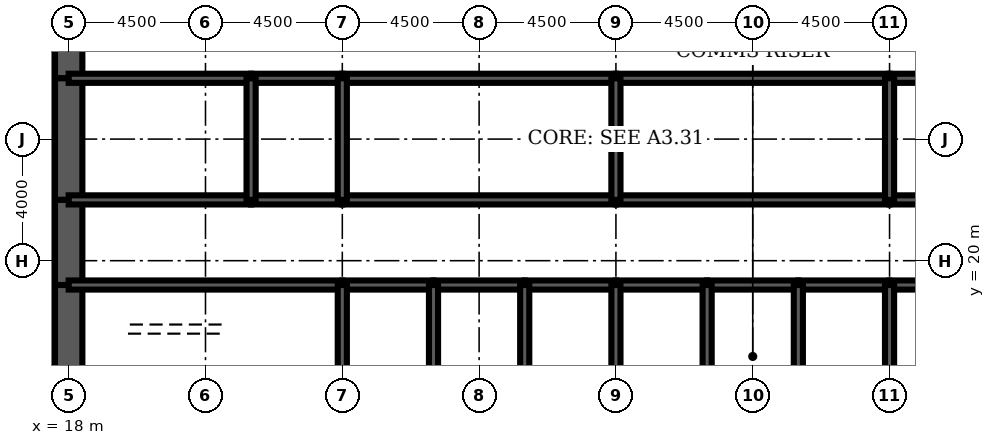
"""IFC4 building model, lengths in metres.
Left out: names, types, materials, properties, quantities, classifications, styles, units other than length and angle.
Written with IfcOpenShell. Run it as: python <this file> out.ifc"""

import sys

from ifc_helpers import new_model, si_unit, direction, frame, frame_2d, origin, place, context, subcontext, project, spatial, rectangle, extrude, element, fill, save


model = new_model("IFC4")
c1 = context("Model", 3, precision=1e-05, world=origin(), true_north=direction((0.0, 1.0)))
c2 = subcontext(c1, "Body", "Model", "MODEL_VIEW")
j1 = project(units=[si_unit("LENGTHUNIT", "METRE"), si_unit("PLANEANGLEUNIT", "RADIAN")], contexts=[c1])
p1 = place(None, origin())
s1 = spatial("IfcSite", under=j1, at=p1, CompositionType="ELEMENT")
p2 = place(p1, origin())
s2 = spatial("IfcBuilding", under=s1, at=p2, CompositionType="ELEMENT")
p3 = place(p2, frame((0.0, 0.0, 134.1)))
s3 = spatial("IfcBuildingStorey", under=s2, at=p3, CompositionType="ELEMENT", Elevation=134.1)
p4 = place(p3, frame((18.0, 28.8, 0.0), z_axis=(0.0, 0.0, 1.0), x_axis=(0.0, -1.0, 0.0)))
e1 = element("IfcWall", 1, at=p4, inside=s3, PredefinedType="SHEAR", context=c2, shape_type="SweptSolid", body=[
    extrude(rectangle(XDim=2.8, YDim=0.9, at=frame_2d((1.4, 0.0))), origin(), (0.0, 0.0, 1.0), 4.2),
])
p5 = place(p4, frame((0.4, 0.0, 0.0)))
e2 = element("IfcOpeningElement", 2, at=p5, cuts=e1, PredefinedType="OPENING", context=c2, shape_type="SweptSolid", body=[
    extrude(rectangle(XDim=1.8, YDim=2.1, at=frame_2d((0.9, 1.05))), frame((0.0, 0.46, 0.0), z_axis=(0.0, -1.0, 0.0), x_axis=(1.0, 0.0, 0.0)), (0.0, 0.0, 1.0), 0.92),
])
p6 = place(p3, frame((18.0, 26.0, 0.0), z_axis=(0.0, 0.0, 1.0), x_axis=(0.0, -1.0, 0.0)))
e3 = element("IfcWall", 3, at=p6, inside=s3, PredefinedType="SHEAR", context=c2, shape_type="SweptSolid", body=[
    extrude(rectangle(XDim=4.0, YDim=0.9, at=frame_2d((2.0, 0.0))), origin(), (0.0, 0.0, 1.0), 4.2),
])
p7 = place(p3, frame((18.0, 22.0, 0.0), z_axis=(0.0, 0.0, 1.0), x_axis=(0.0, -1.0, 0.0)))
e4 = element("IfcWall", 4, at=p7, inside=s3, PredefinedType="SHEAR", context=c2, shape_type="SweptSolid", body=[
    extrude(rectangle(XDim=2.8, YDim=0.9, at=frame_2d((1.4, 0.0))), origin(), (0.0, 0.0, 1.0), 4.2),
])
p8 = place(p7, frame((0.6, 0.0, 0.0)))
e5 = element("IfcOpeningElement", 5, at=p8, cuts=e4, PredefinedType="OPENING", context=c2, shape_type="SweptSolid", body=[
    extrude(rectangle(XDim=1.8, YDim=2.1, at=frame_2d((0.9, 1.05))), frame((0.0, 0.46, 0.0), z_axis=(0.0, -1.0, 0.0), x_axis=(1.0, 0.0, 0.0)), (0.0, 0.0, 1.0), 0.92),
])
p9 = place(p3, frame((18.0, 19.2, 0.0), z_axis=(0.0, 0.0, 1.0), x_axis=(0.0, -1.0, 0.0)))
e6 = element("IfcWall", 6, at=p9, inside=s3, PredefinedType="SHEAR", context=c2, shape_type="SweptSolid", body=[
    extrude(rectangle(XDim=3.2, YDim=0.9, at=frame_2d((1.6, 0.0))), origin(), (0.0, 0.0, 1.0), 4.2),
])
p10 = place(p3, frame((18.0, 19.2, 0.0), z_axis=(0.0, 0.0, 1.0), x_axis=(1.0, 0.0, 0.0)))
e7 = element("IfcWall", 7, at=p10, inside=s3, PredefinedType="SOLIDWALL", context=c2, shape_type="SweptSolid", body=[
    extrude(rectangle(XDim=9.0, YDim=0.3, at=frame_2d((4.5, 0.0))), origin(), (0.0, 0.0, 1.0), 4.2),
])
p11 = place(p10, frame((0.65, 0.0, 0.0)))
e8 = element("IfcOpeningElement", 8, at=p11, cuts=e7, PredefinedType="OPENING", context=c2, shape_type="SweptSolid", body=[
    extrude(rectangle(XDim=1.0, YDim=2.1, at=frame_2d((0.5, 1.05))), frame((0.0, 0.16, 0.0), z_axis=(0.0, -1.0, 0.0), x_axis=(1.0, 0.0, 0.0)), (0.0, 0.0, 1.0), 0.32),
])
p12 = place(p3, frame((27.0, 19.2, 0.0), z_axis=(0.0, 0.0, 1.0), x_axis=(1.0, 0.0, 0.0)))
e9 = element("IfcWall", 9, at=p12, inside=s3, PredefinedType="SOLIDWALL", context=c2, shape_type="SweptSolid", body=[
    extrude(rectangle(XDim=3.0, YDim=0.3, at=frame_2d((1.5, 0.0))), origin(), (0.0, 0.0, 1.0), 4.2),
])
p13 = place(p12, frame((0.95, 0.0, 0.0)))
e10 = element("IfcOpeningElement", 10, at=p13, cuts=e9, PredefinedType="OPENING", context=c2, shape_type="SweptSolid", body=[
    extrude(rectangle(XDim=1.1, YDim=2.2, at=frame_2d((0.55, 1.1))), frame((0.0, 0.16, 0.0), z_axis=(0.0, -1.0, 0.0), x_axis=(1.0, 0.0, 0.0)), (0.0, 0.0, 1.0), 0.32),
])
p14 = place(p3, frame((30.0, 19.2, 0.0), z_axis=(0.0, 0.0, 1.0), x_axis=(1.0, 0.0, 0.0)))
e11 = element("IfcWall", 11, at=p14, inside=s3, PredefinedType="SOLIDWALL", context=c2, shape_type="SweptSolid", body=[
    extrude(rectangle(XDim=3.0, YDim=0.3, at=frame_2d((1.5, 0.0))), origin(), (0.0, 0.0, 1.0), 4.2),
])
p15 = place(p14, frame((0.95, 0.0, 0.0)))
e12 = element("IfcOpeningElement", 12, at=p15, cuts=e11, PredefinedType="OPENING", context=c2, shape_type="SweptSolid", body=[
    extrude(rectangle(XDim=1.1, YDim=2.2, at=frame_2d((0.55, 1.1))), frame((0.0, 0.16, 0.0), z_axis=(0.0, -1.0, 0.0), x_axis=(1.0, 0.0, 0.0)), (0.0, 0.0, 1.0), 0.32),
])
p16 = place(p3, frame((33.0, 19.2, 0.0), z_axis=(0.0, 0.0, 1.0), x_axis=(1.0, 0.0, 0.0)))
e13 = element("IfcWall", 13, at=p16, inside=s3, PredefinedType="SOLIDWALL", context=c2, shape_type="SweptSolid", body=[
    extrude(rectangle(XDim=3.0, YDim=0.3, at=frame_2d((1.5, 0.0))), origin(), (0.0, 0.0, 1.0), 4.2),
])
p17 = place(p16, frame((0.95, 0.0, 0.0)))
e14 = element("IfcOpeningElement", 14, at=p17, cuts=e13, PredefinedType="OPENING", context=c2, shape_type="SweptSolid", body=[
    extrude(rectangle(XDim=1.1, YDim=2.2, at=frame_2d((0.55, 1.1))), frame((0.0, 0.16, 0.0), z_axis=(0.0, -1.0, 0.0), x_axis=(1.0, 0.0, 0.0)), (0.0, 0.0, 1.0), 0.32),
])
p18 = place(p3, frame((36.0, 19.2, 0.0), z_axis=(0.0, 0.0, 1.0), x_axis=(1.0, 0.0, 0.0)))
e15 = element("IfcWall", 15, at=p18, inside=s3, PredefinedType="SOLIDWALL", context=c2, shape_type="SweptSolid", body=[
    extrude(rectangle(XDim=3.0, YDim=0.3, at=frame_2d((1.5, 0.0))), origin(), (0.0, 0.0, 1.0), 4.2),
])
p19 = place(p18, frame((0.95, 0.0, 0.0)))
e16 = element("IfcOpeningElement", 16, at=p19, cuts=e15, PredefinedType="OPENING", context=c2, shape_type="SweptSolid", body=[
    extrude(rectangle(XDim=1.1, YDim=2.2, at=frame_2d((0.55, 1.1))), frame((0.0, 0.16, 0.0), z_axis=(0.0, -1.0, 0.0), x_axis=(1.0, 0.0, 0.0)), (0.0, 0.0, 1.0), 0.32),
])
p20 = place(p3, frame((39.0, 19.2, 0.0), z_axis=(0.0, 0.0, 1.0), x_axis=(1.0, 0.0, 0.0)))
e17 = element("IfcWall", 17, at=p20, inside=s3, PredefinedType="SOLIDWALL", context=c2, shape_type="SweptSolid", body=[
    extrude(rectangle(XDim=3.0, YDim=0.3, at=frame_2d((1.5, 0.0))), origin(), (0.0, 0.0, 1.0), 4.2),
])
p21 = place(p20, frame((1.0, 0.0, 0.0)))
e18 = element("IfcOpeningElement", 18, at=p21, cuts=e17, PredefinedType="OPENING", context=c2, shape_type="SweptSolid", body=[
    extrude(rectangle(XDim=1.0, YDim=2.1, at=frame_2d((0.5, 1.05))), frame((0.0, 0.16, 0.0), z_axis=(0.0, -1.0, 0.0), x_axis=(1.0, 0.0, 0.0)), (0.0, 0.0, 1.0), 0.32),
])
p22 = place(p3, frame((42.0, 19.2, 0.0), z_axis=(0.0, 0.0, 1.0), x_axis=(1.0, 0.0, 0.0)))
e19 = element("IfcWall", 19, at=p22, inside=s3, PredefinedType="SOLIDWALL", context=c2, shape_type="SweptSolid", body=[
    extrude(rectangle(XDim=3.0, YDim=0.3, at=frame_2d((1.5, 0.0))), origin(), (0.0, 0.0, 1.0), 4.2),
])
p23 = place(p3, frame((45.0, 19.2, 0.0), z_axis=(0.0, 0.0, 1.0), x_axis=(1.0, 0.0, 0.0)))
e20 = element("IfcWall", 20, at=p23, inside=s3, PredefinedType="SOLIDWALL", context=c2, shape_type="SweptSolid", body=[
    extrude(rectangle(XDim=9.0, YDim=0.3, at=frame_2d((4.5, 0.0))), origin(), (0.0, 0.0, 1.0), 4.2),
])
p24 = place(p23, frame((7.35, 0.0, 0.0)))
e21 = element("IfcOpeningElement", 21, at=p24, cuts=e20, PredefinedType="OPENING", context=c2, shape_type="SweptSolid", body=[
    extrude(rectangle(XDim=1.0, YDim=2.1, at=frame_2d((0.5, 1.05))), frame((0.0, 0.16, 0.0), z_axis=(0.0, -1.0, 0.0), x_axis=(1.0, 0.0, 0.0)), (0.0, 0.0, 1.0), 0.32),
])
p25 = place(p3, frame((18.0, 22.0, 0.0), z_axis=(0.0, 0.0, 1.0), x_axis=(1.0, 0.0, 0.0)))
e22 = element("IfcWall", 22, at=p25, inside=s3, PredefinedType="SOLIDWALL", context=c2, shape_type="SweptSolid", body=[
    extrude(rectangle(XDim=6.0, YDim=0.3, at=frame_2d((3.0, 0.0))), origin(), (0.0, 0.0, 1.0), 4.2),
])
p26 = place(p25, frame((4.4, 0.0, 0.0)))
e23 = element("IfcOpeningElement", 23, at=p26, cuts=e22, PredefinedType="OPENING", context=c2, shape_type="SweptSolid", body=[
    extrude(rectangle(XDim=1.0, YDim=2.1, at=frame_2d((0.5, 1.05))), frame((0.0, 0.16, 0.0), z_axis=(0.0, -1.0, 0.0), x_axis=(1.0, 0.0, 0.0)), (0.0, 0.0, 1.0), 0.32),
])
p27 = place(p25, frame((0.7, 0.0, 0.0)))
e24 = element("IfcOpeningElement", 24, at=p27, cuts=e22, PredefinedType="OPENING", context=c2, shape_type="SweptSolid", body=[
    extrude(rectangle(XDim=1.0, YDim=2.1, at=frame_2d((0.5, 1.05))), frame((0.0, 0.16, 0.0), z_axis=(0.0, -1.0, 0.0), x_axis=(1.0, 0.0, 0.0)), (0.0, 0.0, 1.0), 0.32),
])
p28 = place(p3, frame((24.0, 22.0, 0.0), z_axis=(0.0, 0.0, 1.0), x_axis=(1.0, 0.0, 0.0)))
e25 = element("IfcWall", 25, at=p28, inside=s3, PredefinedType="SOLIDWALL", context=c2, shape_type="SweptSolid", body=[
    extrude(rectangle(XDim=3.0, YDim=0.3, at=frame_2d((1.5, 0.0))), origin(), (0.0, 0.0, 1.0), 4.2),
])
p29 = place(p28, frame((1.0, 0.0, 0.0)))
e26 = element("IfcOpeningElement", 26, at=p29, cuts=e25, PredefinedType="OPENING", context=c2, shape_type="SweptSolid", body=[
    extrude(rectangle(XDim=1.0, YDim=2.1, at=frame_2d((0.5, 1.05))), frame((0.0, 0.16, 0.0), z_axis=(0.0, -1.0, 0.0), x_axis=(1.0, 0.0, 0.0)), (0.0, 0.0, 1.0), 0.32),
])
p30 = place(p3, frame((27.0, 22.0, 0.0), z_axis=(0.0, 0.0, 1.0), x_axis=(1.0, 0.0, 0.0)))
e27 = element("IfcWall", 27, at=p30, inside=s3, PredefinedType="SOLIDWALL", context=c2, shape_type="SweptSolid", body=[
    extrude(rectangle(XDim=9.0, YDim=0.3, at=frame_2d((4.5, 0.0))), origin(), (0.0, 0.0, 1.0), 4.2),
])
p31 = place(p30, frame((4.0, 0.0, 0.0)))
e28 = element("IfcOpeningElement", 28, at=p31, cuts=e27, PredefinedType="OPENING", context=c2, shape_type="SweptSolid", body=[
    extrude(rectangle(XDim=1.0, YDim=2.1, at=frame_2d((0.5, 1.05))), frame((0.0, 0.16, 0.0), z_axis=(0.0, -1.0, 0.0), x_axis=(1.0, 0.0, 0.0)), (0.0, 0.0, 1.0), 0.32),
])
p32 = place(p3, frame((36.0, 22.0, 0.0), z_axis=(0.0, 0.0, 1.0), x_axis=(1.0, 0.0, 0.0)))
e29 = element("IfcWall", 29, at=p32, inside=s3, PredefinedType="SOLIDWALL", context=c2, shape_type="SweptSolid", body=[
    extrude(rectangle(XDim=9.0, YDim=0.3, at=frame_2d((4.5, 0.0))), origin(), (0.0, 0.0, 1.0), 4.2),
])
p33 = place(p32, frame((4.0, 0.0, 0.0)))
e30 = element("IfcOpeningElement", 30, at=p33, cuts=e29, PredefinedType="OPENING", context=c2, shape_type="SweptSolid", body=[
    extrude(rectangle(XDim=1.0, YDim=2.1, at=frame_2d((0.5, 1.05))), frame((0.0, 0.16, 0.0), z_axis=(0.0, -1.0, 0.0), x_axis=(1.0, 0.0, 0.0)), (0.0, 0.0, 1.0), 0.32),
])
p34 = place(p3, frame((45.0, 22.0, 0.0), z_axis=(0.0, 0.0, 1.0), x_axis=(1.0, 0.0, 0.0)))
e31 = element("IfcWall", 31, at=p34, inside=s3, PredefinedType="SOLIDWALL", context=c2, shape_type="SweptSolid", body=[
    extrude(rectangle(XDim=3.0, YDim=0.3, at=frame_2d((1.5, 0.0))), origin(), (0.0, 0.0, 1.0), 4.2),
])
p35 = place(p34, frame((1.0, 0.0, 0.0)))
e32 = element("IfcOpeningElement", 32, at=p35, cuts=e31, PredefinedType="OPENING", context=c2, shape_type="SweptSolid", body=[
    extrude(rectangle(XDim=1.0, YDim=2.1, at=frame_2d((0.5, 1.05))), frame((0.0, 0.16, 0.0), z_axis=(0.0, -1.0, 0.0), x_axis=(1.0, 0.0, 0.0)), (0.0, 0.0, 1.0), 0.32),
])
p36 = place(p3, frame((18.0, 26.0, 0.0), z_axis=(0.0, 0.0, 1.0), x_axis=(1.0, 0.0, 0.0)))
e33 = element("IfcWall", 33, at=p36, inside=s3, PredefinedType="SOLIDWALL", context=c2, shape_type="SweptSolid", body=[
    extrude(rectangle(XDim=6.0, YDim=0.3, at=frame_2d((3.0, 0.0))), origin(), (0.0, 0.0, 1.0), 4.2),
])
p37 = place(p3, frame((24.0, 26.0, 0.0), z_axis=(0.0, 0.0, 1.0), x_axis=(1.0, 0.0, 0.0)))
e34 = element("IfcWall", 34, at=p37, inside=s3, PredefinedType="SOLIDWALL", context=c2, shape_type="SweptSolid", body=[
    extrude(rectangle(XDim=3.0, YDim=0.3, at=frame_2d((1.5, 0.0))), origin(), (0.0, 0.0, 1.0), 4.2),
])
for number, where, z_axis, x_axis in (
    (35, (27.0, 26.0, 0.0), (0.0, 0.0, 1.0), (1.0, 0.0, 0.0)),
    (36, (36.0, 26.0, 0.0), (0.0, 0.0, 1.0), (1.0, 0.0, 0.0)),
):
    element("IfcWall", number, at=place(p3, frame(where, z_axis=z_axis, x_axis=x_axis)), inside=s3, PredefinedType="SOLIDWALL", context=c2, shape_type="SweptSolid", body=[
        extrude(rectangle(XDim=9.0, YDim=0.3, at=frame_2d((4.5, 0.0))), origin(), (0.0, 0.0, 1.0), 4.2),
    ])
p38 = place(p3, frame((45.0, 26.0, 0.0), z_axis=(0.0, 0.0, 1.0), x_axis=(1.0, 0.0, 0.0)))
e37 = element("IfcWall", 37, at=p38, inside=s3, PredefinedType="SOLIDWALL", context=c2, shape_type="SweptSolid", body=[
    extrude(rectangle(XDim=3.0, YDim=0.3, at=frame_2d((1.5, 0.0))), origin(), (0.0, 0.0, 1.0), 4.2),
])
for number, where, z_axis, x_axis in (
    (38, (27.0, 16.0, 0.0), (0.0, 0.0, 1.0), (0.0, 1.0, 0.0)),
    (39, (30.0, 16.0, 0.0), (0.0, 0.0, 1.0), (0.0, 1.0, 0.0)),
    (40, (33.0, 16.0, 0.0), (0.0, 0.0, 1.0), (0.0, 1.0, 0.0)),
    (41, (36.0, 16.0, 0.0), (0.0, 0.0, 1.0), (0.0, 1.0, 0.0)),
    (42, (39.0, 16.0, 0.0), (0.0, 0.0, 1.0), (0.0, 1.0, 0.0)),
    (43, (42.0, 16.0, 0.0), (0.0, 0.0, 1.0), (0.0, 1.0, 0.0)),
    (44, (45.0, 16.0, 0.0), (0.0, 0.0, 1.0), (0.0, 1.0, 0.0)),
):
    element("IfcWall", number, at=place(p3, frame(where, z_axis=z_axis, x_axis=x_axis)), inside=s3, PredefinedType="SOLIDWALL", context=c2, shape_type="SweptSolid", body=[
        extrude(rectangle(XDim=3.2, YDim=0.3, at=frame_2d((1.6, 0.0))), origin(), (0.0, 0.0, 1.0), 4.2),
    ])
for number, where, z_axis, x_axis in (
    (45, (24.0, 22.0, 0.0), (0.0, 0.0, 1.0), (0.0, 1.0, 0.0)),
    (46, (27.0, 22.0, 0.0), (0.0, 0.0, 1.0), (0.0, 1.0, 0.0)),
    (47, (36.0, 22.0, 0.0), (0.0, 0.0, 1.0), (0.0, 1.0, 0.0)),
    (48, (45.0, 22.0, 0.0), (0.0, 0.0, 1.0), (0.0, 1.0, 0.0)),
):
    element("IfcWall", number, at=place(p3, frame(where, z_axis=z_axis, x_axis=x_axis)), inside=s3, PredefinedType="SOLIDWALL", context=c2, shape_type="SweptSolid", body=[
        extrude(rectangle(XDim=4.0, YDim=0.3, at=frame_2d((2.0, 0.0))), origin(), (0.0, 0.0, 1.0), 4.2),
    ])
p39 = place(p3, frame((39.15, 17.4, 0.0), z_axis=(0.0, 0.0, 1.0), x_axis=(1.0, 0.0, 0.0)))
e49 = element("IfcWall", 49, at=p39, inside=s3, PredefinedType="SOLIDWALL", context=c2, shape_type="SweptSolid", body=[
    extrude(rectangle(XDim=2.7, YDim=0.3, at=frame_2d((1.35, 0.0))), origin(), (0.0, 0.0, 1.0), 4.04),
])
p40 = place(p39, frame((0.85, 0.0, 0.0)))
e50 = element("IfcOpeningElement", 50, at=p40, cuts=e49, PredefinedType="OPENING", context=c2, shape_type="SweptSolid", body=[
    extrude(rectangle(XDim=1.0, YDim=2.1, at=frame_2d((0.5, 1.05))), frame((0.0, 0.16, 0.0), z_axis=(0.0, -1.0, 0.0), x_axis=(1.0, 0.0, 0.0)), (0.0, 0.0, 1.0), 0.32),
])
p41 = place(p3, frame((20.025, 22.15, 0.0), z_axis=(0.0, 0.0, 1.0), x_axis=(0.0, 1.0, 0.0)))
e51 = element("IfcWall", 51, at=p41, inside=s3, PredefinedType="PARTITIONING", context=c2, shape_type="SweptSolid", body=[
    extrude(rectangle(XDim=3.7, YDim=0.15, at=frame_2d((1.85, 0.0))), origin(), (0.0, 0.0, 1.0), 3.0),
])
p42 = place(p3, frame((24.5, 19.35, 0.0), z_axis=(0.0, 0.0, 1.0), x_axis=(0.0, 1.0, 0.0)))
e52 = element("IfcWall", 52, at=p42, inside=s3, PredefinedType="PARTITIONING", context=c2, shape_type="SweptSolid", body=[
    extrude(rectangle(XDim=2.5, YDim=0.15, at=frame_2d((1.25, 0.0))), origin(), (0.0, 0.0, 1.0), 3.0),
])
p43 = place(p42, frame((1.15, 0.0, 0.0)))
e53 = element("IfcOpeningElement", 53, at=p43, cuts=e52, PredefinedType="OPENING", context=c2, shape_type="SweptSolid", body=[
    extrude(rectangle(XDim=1.0, YDim=2.1, at=frame_2d((0.5, 1.05))), frame((0.0, 0.085, 0.0), z_axis=(0.0, -1.0, 0.0), x_axis=(1.0, 0.0, 0.0)), (0.0, 0.0, 1.0), 0.17),
])
p44 = place(p40, origin())
e54 = element("IfcDoor", 54, at=p44, inside=s3, OperationType="SINGLE_SWING_LEFT", PredefinedType="DOOR", context=c2, shape_type="SweptSolid", body=[
    extrude(rectangle(XDim=1.0, YDim=2.1, at=frame_2d((0.5, 1.05))), frame((0.0, 0.025, 0.0), z_axis=(0.0, -1.0, 0.0), x_axis=(1.0, 0.0, 0.0)), (0.0, 0.0, 1.0), 0.05),
])
fill(e50, e54)
p45 = place(p43, origin())
e55 = element("IfcDoor", 55, at=p45, inside=s3, OperationType="SINGLE_SWING_RIGHT", PredefinedType="DOOR", context=c2, shape_type="SweptSolid", body=[
    extrude(rectangle(XDim=1.0, YDim=2.1, at=frame_2d((0.5, 1.05))), frame((0.0, 0.025, 0.0), z_axis=(0.0, -1.0, 0.0), x_axis=(1.0, 0.0, 0.0)), (0.0, 0.0, 1.0), 0.05),
])
fill(e53, e55)
p46 = place(p13, origin())
e56 = element("IfcDoor", 56, at=p46, inside=s3, OperationType="DOUBLE_DOOR_SLIDING", PredefinedType="USERDEFINED", context=c2, shape_type="SweptSolid", body=[
    extrude(rectangle(XDim=1.1, YDim=2.2, at=frame_2d((0.55, 1.1))), frame((0.0, 0.025, 0.0), z_axis=(0.0, -1.0, 0.0), x_axis=(1.0, 0.0, 0.0)), (0.0, 0.0, 1.0), 0.05),
])
fill(e10, e56)
p47 = place(p15, origin())
e57 = element("IfcDoor", 57, at=p47, inside=s3, OperationType="DOUBLE_DOOR_SLIDING", PredefinedType="USERDEFINED", context=c2, shape_type="SweptSolid", body=[
    extrude(rectangle(XDim=1.1, YDim=2.2, at=frame_2d((0.55, 1.1))), frame((0.0, 0.025, 0.0), z_axis=(0.0, -1.0, 0.0), x_axis=(1.0, 0.0, 0.0)), (0.0, 0.0, 1.0), 0.05),
])
fill(e12, e57)
p48 = place(p17, origin())
e58 = element("IfcDoor", 58, at=p48, inside=s3, OperationType="DOUBLE_DOOR_SLIDING", PredefinedType="USERDEFINED", context=c2, shape_type="SweptSolid", body=[
    extrude(rectangle(XDim=1.1, YDim=2.2, at=frame_2d((0.55, 1.1))), frame((0.0, 0.025, 0.0), z_axis=(0.0, -1.0, 0.0), x_axis=(1.0, 0.0, 0.0)), (0.0, 0.0, 1.0), 0.05),
])
fill(e14, e58)
p49 = place(p19, origin())
e59 = element("IfcDoor", 59, at=p49, inside=s3, OperationType="DOUBLE_DOOR_SLIDING", PredefinedType="USERDEFINED", context=c2, shape_type="SweptSolid", body=[
    extrude(rectangle(XDim=1.1, YDim=2.2, at=frame_2d((0.55, 1.1))), frame((0.0, 0.025, 0.0), z_axis=(0.0, -1.0, 0.0), x_axis=(1.0, 0.0, 0.0)), (0.0, 0.0, 1.0), 0.05),
])
fill(e16, e59)
p50 = place(p11, origin())
e60 = element("IfcDoor", 60, at=p50, inside=s3, OperationType="SINGLE_SWING_LEFT", PredefinedType="DOOR", context=c2, shape_type="SweptSolid", body=[
    extrude(rectangle(XDim=1.0, YDim=2.1, at=frame_2d((0.5, 1.05))), frame((0.0, 0.025, 0.0), z_axis=(0.0, -1.0, 0.0), x_axis=(1.0, 0.0, 0.0)), (0.0, 0.0, 1.0), 0.05),
])
fill(e8, e60)
p51 = place(p8, origin())
e61 = element("IfcDoor", 61, at=p51, inside=s3, OperationType="SINGLE_SWING_LEFT", PredefinedType="DOOR", context=c2, shape_type="SweptSolid", body=[
    extrude(rectangle(XDim=1.8, YDim=2.1, at=frame_2d((0.9, 1.05))), frame((0.0, 0.45, 0.0), z_axis=(0.0, -1.0, 0.0), x_axis=(1.0, 0.0, 0.0)), (0.0, 0.0, 1.0), 0.899),
])
fill(e5, e61)
p52 = place(p5, origin())
e62 = element("IfcDoor", 62, at=p52, inside=s3, OperationType="SINGLE_SWING_LEFT", PredefinedType="DOOR", context=c2, shape_type="SweptSolid", body=[
    extrude(rectangle(XDim=1.8, YDim=2.1, at=frame_2d((0.9, 1.05))), frame((0.0, 0.45, 0.0), z_axis=(0.0, -1.0, 0.0), x_axis=(1.0, 0.0, 0.0)), (0.0, 0.0, 1.0), 0.899),
])
fill(e2, e62)
p53 = place(p26, origin())
e63 = element("IfcDoor", 63, at=p53, inside=s3, OperationType="SINGLE_SWING_RIGHT", PredefinedType="DOOR", context=c2, shape_type="SweptSolid", body=[
    extrude(rectangle(XDim=1.0, YDim=2.1, at=frame_2d((0.5, 1.05))), frame((0.0, 0.025, 0.0), z_axis=(0.0, -1.0, 0.0), x_axis=(1.0, 0.0, 0.0)), (0.0, 0.0, 1.0), 0.05),
])
fill(e23, e63)
p54 = place(p29, origin())
e64 = element("IfcDoor", 64, at=p54, inside=s3, OperationType="SINGLE_SWING_LEFT", PredefinedType="DOOR", context=c2, shape_type="SweptSolid", body=[
    extrude(rectangle(XDim=1.0, YDim=2.1, at=frame_2d((0.5, 1.05))), frame((0.0, 0.025, 0.0), z_axis=(0.0, -1.0, 0.0), x_axis=(1.0, 0.0, 0.0)), (0.0, 0.0, 1.0), 0.05),
])
fill(e26, e64)
p55 = place(p31, origin())
e65 = element("IfcDoor", 65, at=p55, inside=s3, OperationType="SINGLE_SWING_LEFT", PredefinedType="DOOR", context=c2, shape_type="SweptSolid", body=[
    extrude(rectangle(XDim=1.0, YDim=2.1, at=frame_2d((0.5, 1.05))), frame((0.0, 0.025, 0.0), z_axis=(0.0, -1.0, 0.0), x_axis=(1.0, 0.0, 0.0)), (0.0, 0.0, 1.0), 0.05),
])
fill(e28, e65)
p56 = place(p33, origin())
e66 = element("IfcDoor", 66, at=p56, inside=s3, OperationType="SINGLE_SWING_LEFT", PredefinedType="DOOR", context=c2, shape_type="SweptSolid", body=[
    extrude(rectangle(XDim=1.0, YDim=2.1, at=frame_2d((0.5, 1.05))), frame((0.0, 0.025, 0.0), z_axis=(0.0, -1.0, 0.0), x_axis=(1.0, 0.0, 0.0)), (0.0, 0.0, 1.0), 0.05),
])
fill(e30, e66)
p57 = place(p27, origin())
e67 = element("IfcDoor", 67, at=p57, inside=s3, OperationType="SINGLE_SWING_LEFT", PredefinedType="DOOR", context=c2, shape_type="SweptSolid", body=[
    extrude(rectangle(XDim=1.0, YDim=2.1, at=frame_2d((0.5, 1.05))), frame((0.0, 0.025, 0.0), z_axis=(0.0, -1.0, 0.0), x_axis=(1.0, 0.0, 0.0)), (0.0, 0.0, 1.0), 0.05),
])
fill(e24, e67)
p58 = place(p21, origin())
e68 = element("IfcDoor", 68, at=p58, inside=s3, OperationType="SINGLE_SWING_LEFT", PredefinedType="DOOR", context=c2, shape_type="SweptSolid", body=[
    extrude(rectangle(XDim=1.0, YDim=2.1, at=frame_2d((0.5, 1.05))), frame((0.0, 0.025, 0.0), z_axis=(0.0, -1.0, 0.0), x_axis=(1.0, 0.0, 0.0)), (0.0, 0.0, 1.0), 0.05),
])
fill(e18, e68)
save(model, sys.argv[1])
